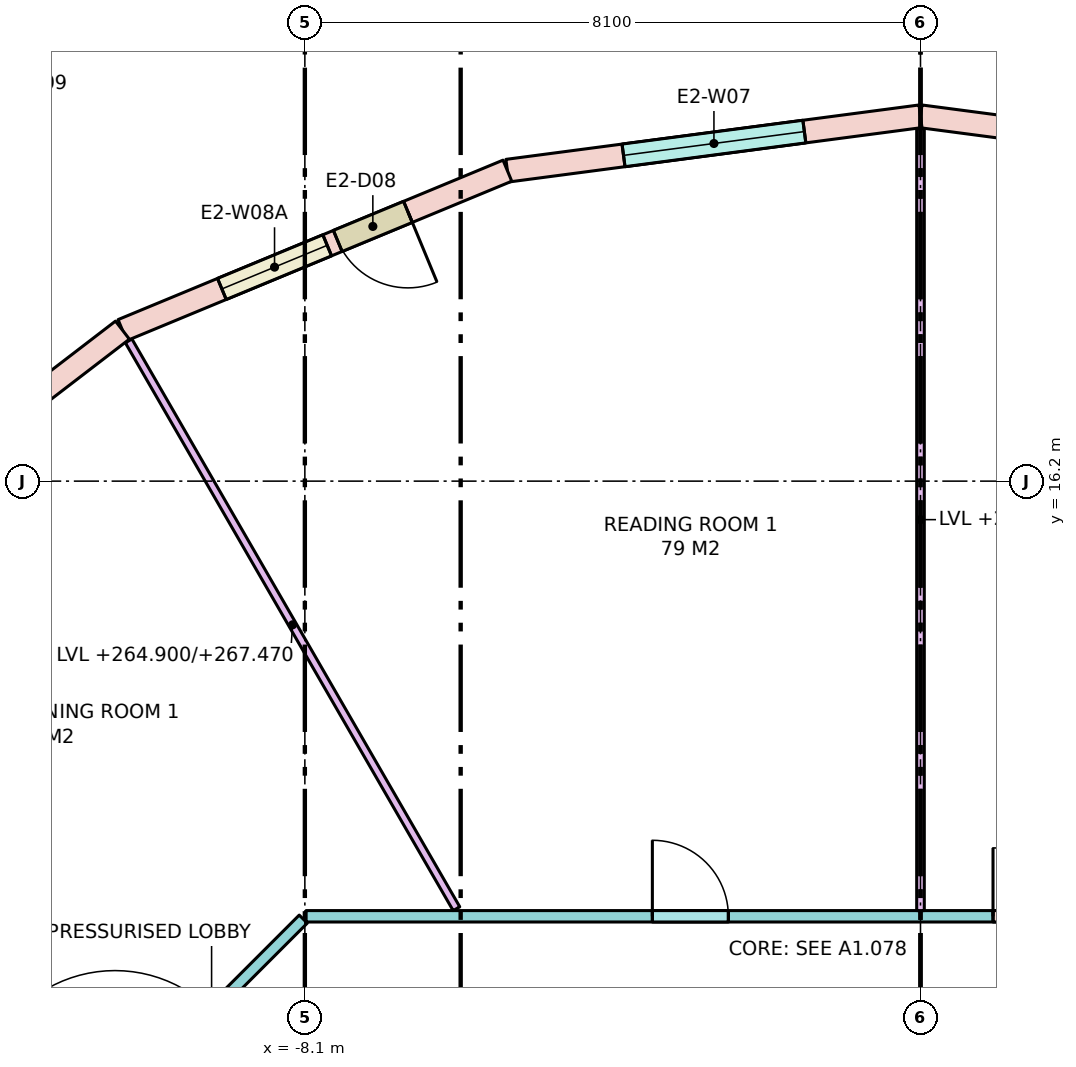
"""IFC4 building model, lengths in metres.
Left out: names, types, materials, properties, quantities, classifications, styles, units other than length and angle.
Written with IfcOpenShell. Run it as: python <this file> out.ifc"""

import sys

from ifc_helpers import new_model, si_unit, direction, frame, frame_2d, origin, place, context, subcontext, project, spatial, rectangle, extrude, element, fill, save


model = new_model("IFC4")
c1 = context("Model", 3, precision=1e-05, world=origin(), true_north=direction((0.0, 1.0)))
c2 = subcontext(c1, "Body", "Model", "MODEL_VIEW")
j1 = project(units=[si_unit("LENGTHUNIT", "METRE"), si_unit("PLANEANGLEUNIT", "RADIAN")], contexts=[c1])
p1 = place(None, origin())
s1 = spatial("IfcSite", under=j1, at=p1, CompositionType="ELEMENT")
p2 = place(p1, origin())
s2 = spatial("IfcBuilding", under=s1, at=p2, CompositionType="ELEMENT")
p3 = place(p2, frame((0.0, 0.0, 264.9)))
s3 = spatial("IfcBuildingStorey", under=s2, at=p3, CompositionType="ELEMENT", Elevation=264.9)
p4 = place(p3, frame((5.435, 20.284, 0.0), z_axis=(0.0, 0.0, 1.0), x_axis=(-0.991444743541, 0.130527087244, 0.0)))
e1 = element("IfcWall", 1, at=p4, inside=s3, PredefinedType="STANDARD", context=c2, shape_type="SweptSolid", body=[
    extrude(rectangle(XDim=5.482, YDim=0.3, at=frame_2d((2.741, 0.0))), origin(), (0.0, 0.0, 1.0), 3.42),
])
p5 = place(p4, frame((1.416, 0.0, 0.0)))
e2 = element("IfcOpeningElement", 2, at=p5, cuts=e1, PredefinedType="OPENING", context=c2, shape_type="SweptSolid", body=[
    extrude(rectangle(XDim=1.0, YDim=2.4, at=frame_2d((0.5, 1.2))), frame((0.0, 0.16, 0.0), z_axis=(0.0, -1.0, 0.0), x_axis=(1.0, 0.0, 0.0)), (0.0, 0.0, 1.0), 0.32),
])
p6 = place(p4, frame((2.566, 0.0, 0.8)))
e3 = element("IfcOpeningElement", 3, at=p6, cuts=e1, PredefinedType="OPENING", context=c2, shape_type="SweptSolid", body=[
    extrude(rectangle(XDim=1.5, YDim=2.4, at=frame_2d((0.75, 1.2))), frame((0.0, 0.16, 0.0), z_axis=(0.0, -1.0, 0.0), x_axis=(1.0, 0.0, 0.0)), (0.0, 0.0, 1.0), 0.32),
])
p7 = place(p3, frame((0.0, 21.0, 0.0), z_axis=(0.0, 0.0, 1.0), x_axis=(-0.991444743541, -0.130527087244, 0.0)))
e4 = element("IfcWall", 4, at=p7, inside=s3, PredefinedType="STANDARD", context=c2, shape_type="SweptSolid", body=[
    extrude(rectangle(XDim=5.482, YDim=0.3, at=frame_2d((2.741, 0.0))), origin(), (0.0, 0.0, 1.0), 3.42),
])
p8 = place(p7, frame((1.541, 0.0, 0.8)))
e5 = element("IfcOpeningElement", 5, at=p8, cuts=e4, PredefinedType="OPENING", context=c2, shape_type="SweptSolid", body=[
    extrude(rectangle(XDim=2.4, YDim=2.4, at=frame_2d((1.2, 1.2))), frame((0.0, 0.16, 0.0), z_axis=(0.0, -1.0, 0.0), x_axis=(1.0, 0.0, 0.0)), (0.0, 0.0, 1.0), 0.32),
])
p9 = place(p3, frame((-5.435, 20.284, 0.0), z_axis=(0.0, 0.0, 1.0), x_axis=(-0.923877333662, -0.382688740813, 0.0)))
e6 = element("IfcWall", 6, at=p9, inside=s3, PredefinedType="STANDARD", context=c2, shape_type="SweptSolid", body=[
    extrude(rectangle(XDim=5.482, YDim=0.3, at=frame_2d((2.741, 0.0))), origin(), (0.0, 0.0, 1.0), 3.42),
])
p10 = place(p9, frame((1.416, 0.0, 0.0)))
e7 = element("IfcOpeningElement", 7, at=p10, cuts=e6, PredefinedType="OPENING", context=c2, shape_type="SweptSolid", body=[
    extrude(rectangle(XDim=1.0, YDim=2.4, at=frame_2d((0.5, 1.2))), frame((0.0, 0.16, 0.0), z_axis=(0.0, -1.0, 0.0), x_axis=(1.0, 0.0, 0.0)), (0.0, 0.0, 1.0), 0.32),
])
p11 = place(p9, frame((2.566, 0.0, 0.8)))
e8 = element("IfcOpeningElement", 8, at=p11, cuts=e6, PredefinedType="OPENING", context=c2, shape_type="SweptSolid", body=[
    extrude(rectangle(XDim=1.5, YDim=2.4, at=frame_2d((0.75, 1.2))), frame((0.0, 0.16, 0.0), z_axis=(0.0, -1.0, 0.0), x_axis=(1.0, 0.0, 0.0)), (0.0, 0.0, 1.0), 0.32),
])
p12 = place(p3, frame((-10.5, 18.187, 0.0), z_axis=(0.0, 0.0, 1.0), x_axis=(-0.793335336593, -0.608784891166, 0.0)))
e9 = element("IfcWall", 9, at=p12, inside=s3, PredefinedType="STANDARD", context=c2, shape_type="SweptSolid", body=[
    extrude(rectangle(XDim=5.482, YDim=0.3, at=frame_2d((2.741, 0.0))), origin(), (0.0, 0.0, 1.0), 3.42),
])
p13 = place(p12, frame((1.541, 0.0, 0.8)))
e10 = element("IfcOpeningElement", 10, at=p13, cuts=e9, PredefinedType="OPENING", context=c2, shape_type="SweptSolid", body=[
    extrude(rectangle(XDim=2.4, YDim=2.4, at=frame_2d((1.2, 1.2))), frame((0.0, 0.16, 0.0), z_axis=(0.0, -1.0, 0.0), x_axis=(1.0, 0.0, 0.0)), (0.0, 0.0, 1.0), 0.32),
])
p14 = place(p3, frame((-12.438, 6.121, 0.0), z_axis=(0.0, 0.0, 1.0), x_axis=(0.707106781187, 0.707106781187, 0.0)))
e11 = element("IfcWall", 11, at=p14, inside=s3, PredefinedType="PARTITIONING", context=c2, shape_type="SweptSolid", body=[
    extrude(rectangle(XDim=6.105, YDim=0.15, at=frame_2d((3.053, 0.0))), origin(), (0.0, 0.0, 1.0), 2.57),
])
p15 = place(p14, frame((2.602, 0.0, 0.0)))
e12 = element("IfcOpeningElement", 12, at=p15, cuts=e11, PredefinedType="OPENING", context=c2, shape_type="SweptSolid", body=[
    extrude(rectangle(XDim=1.8, YDim=2.1, at=frame_2d((0.9, 1.05))), frame((0.0, 0.085, 0.0), z_axis=(0.0, -1.0, 0.0), x_axis=(1.0, 0.0, 0.0)), (0.0, 0.0, 1.0), 0.17),
])
p16 = place(p3, frame((-8.084, 10.475, 0.0), z_axis=(0.0, 0.0, 1.0), x_axis=(1.0, 0.0, 0.0)))
e13 = element("IfcWall", 13, at=p16, inside=s3, PredefinedType="PARTITIONING", context=c2, shape_type="SweptSolid", body=[
    extrude(rectangle(XDim=16.167, YDim=0.15, at=frame_2d((8.084, 0.0))), origin(), (0.0, 0.0, 1.0), 2.57),
])
p17 = place(p16, frame((13.004, 0.0, 0.0)))
e14 = element("IfcOpeningElement", 14, at=p17, cuts=e13, PredefinedType="OPENING", context=c2, shape_type="SweptSolid", body=[
    extrude(rectangle(XDim=1.0, YDim=2.1, at=frame_2d((0.5, 1.05))), frame((0.0, 0.085, 0.0), z_axis=(0.0, -1.0, 0.0), x_axis=(1.0, 0.0, 0.0)), (0.0, 0.0, 1.0), 0.17),
])
p18 = place(p16, frame((9.038, 0.0, 0.0)))
e15 = element("IfcOpeningElement", 15, at=p18, cuts=e13, PredefinedType="OPENING", context=c2, shape_type="SweptSolid", body=[
    extrude(rectangle(XDim=0.9, YDim=2.1, at=frame_2d((0.45, 1.05))), frame((0.0, 0.085, 0.0), z_axis=(0.0, -1.0, 0.0), x_axis=(1.0, 0.0, 0.0)), (0.0, 0.0, 1.0), 0.17),
])
p19 = place(p16, frame((4.556, 0.0, 0.0)))
e16 = element("IfcOpeningElement", 16, at=p19, cuts=e13, PredefinedType="OPENING", context=c2, shape_type="SweptSolid", body=[
    extrude(rectangle(XDim=1.0, YDim=2.1, at=frame_2d((0.5, 1.05))), frame((0.0, 0.085, 0.0), z_axis=(0.0, -1.0, 0.0), x_axis=(1.0, 0.0, 0.0)), (0.0, 0.0, 1.0), 0.17),
])
p20 = place(p3, frame((0.0, 10.55, 0.0), z_axis=(0.0, 0.0, 1.0), x_axis=(0.0, 1.0, 0.0)))
e17 = element("IfcWall", 17, at=p20, inside=s3, PredefinedType="PARTITIONING", context=c2, shape_type="SweptSolid", body=[
    extrude(rectangle(XDim=10.287, YDim=0.1, at=frame_2d((5.143, 0.0))), origin(), (0.0, 0.0, 1.0), 2.57),
])
p21 = place(p3, frame((-6.105, 10.575, 0.0), z_axis=(0.0, 0.0, 1.0), x_axis=(-0.50001399067, 0.866017326117, 0.0)))
e18 = element("IfcWall", 18, at=p21, inside=s3, PredefinedType="PARTITIONING", context=c2, shape_type="SweptSolid", body=[
    extrude(rectangle(XDim=8.626, YDim=0.1, at=frame_2d((4.313, 0.0))), origin(), (0.0, 0.0, 1.0), 2.57),
])
p22 = place(p8, origin())
e19 = element("IfcWindow", 19, at=p22, inside=s3, PartitioningType="SINGLE_PANEL", PredefinedType="WINDOW", context=c2, shape_type="SweptSolid", body=[
    extrude(rectangle(XDim=2.4, YDim=2.4, at=frame_2d((1.2, 1.2))), frame((0.0, 0.03, 0.0), z_axis=(0.0, -1.0, 0.0), x_axis=(1.0, 0.0, 0.0)), (0.0, 0.0, 1.0), 0.06),
])
fill(e5, e19)
p23 = place(p10, origin())
e20 = element("IfcDoor", 20, at=p23, inside=s3, OperationType="SINGLE_SWING_LEFT", PredefinedType="DOOR", context=c2, shape_type="SweptSolid", body=[
    extrude(rectangle(XDim=1.0, YDim=2.4, at=frame_2d((0.5, 1.2))), frame((0.0, 0.025, 0.0), z_axis=(0.0, -1.0, 0.0), x_axis=(1.0, 0.0, 0.0)), (0.0, 0.0, 1.0), 0.05),
])
fill(e7, e20)
p24 = place(p11, origin())
e21 = element("IfcWindow", 21, at=p24, inside=s3, PartitioningType="SINGLE_PANEL", PredefinedType="WINDOW", context=c2, shape_type="SweptSolid", body=[
    extrude(rectangle(XDim=1.5, YDim=2.4, at=frame_2d((0.75, 1.2))), frame((0.0, 0.03, 0.0), z_axis=(0.0, -1.0, 0.0), x_axis=(1.0, 0.0, 0.0)), (0.0, 0.0, 1.0), 0.06),
])
fill(e8, e21)
p25 = place(p18, origin())
e22 = element("IfcDoor", 22, at=p25, inside=s3, OperationType="SINGLE_SWING_LEFT", PredefinedType="DOOR", context=c2, shape_type="SweptSolid", body=[
    extrude(rectangle(XDim=0.9, YDim=2.1, at=frame_2d((0.45, 1.05))), frame((0.0, 0.025, 0.0), z_axis=(0.0, -1.0, 0.0), x_axis=(1.0, 0.0, 0.0)), (0.0, 0.0, 1.0), 0.05),
])
fill(e15, e22)
p26 = place(p19, origin())
e23 = element("IfcDoor", 23, at=p26, inside=s3, OperationType="SINGLE_SWING_LEFT", PredefinedType="DOOR", context=c2, shape_type="SweptSolid", body=[
    extrude(rectangle(XDim=1.0, YDim=2.1, at=frame_2d((0.5, 1.05))), frame((0.0, 0.025, 0.0), z_axis=(0.0, -1.0, 0.0), x_axis=(1.0, 0.0, 0.0)), (0.0, 0.0, 1.0), 0.05),
])
fill(e16, e23)
save(model, sys.argv[1])
